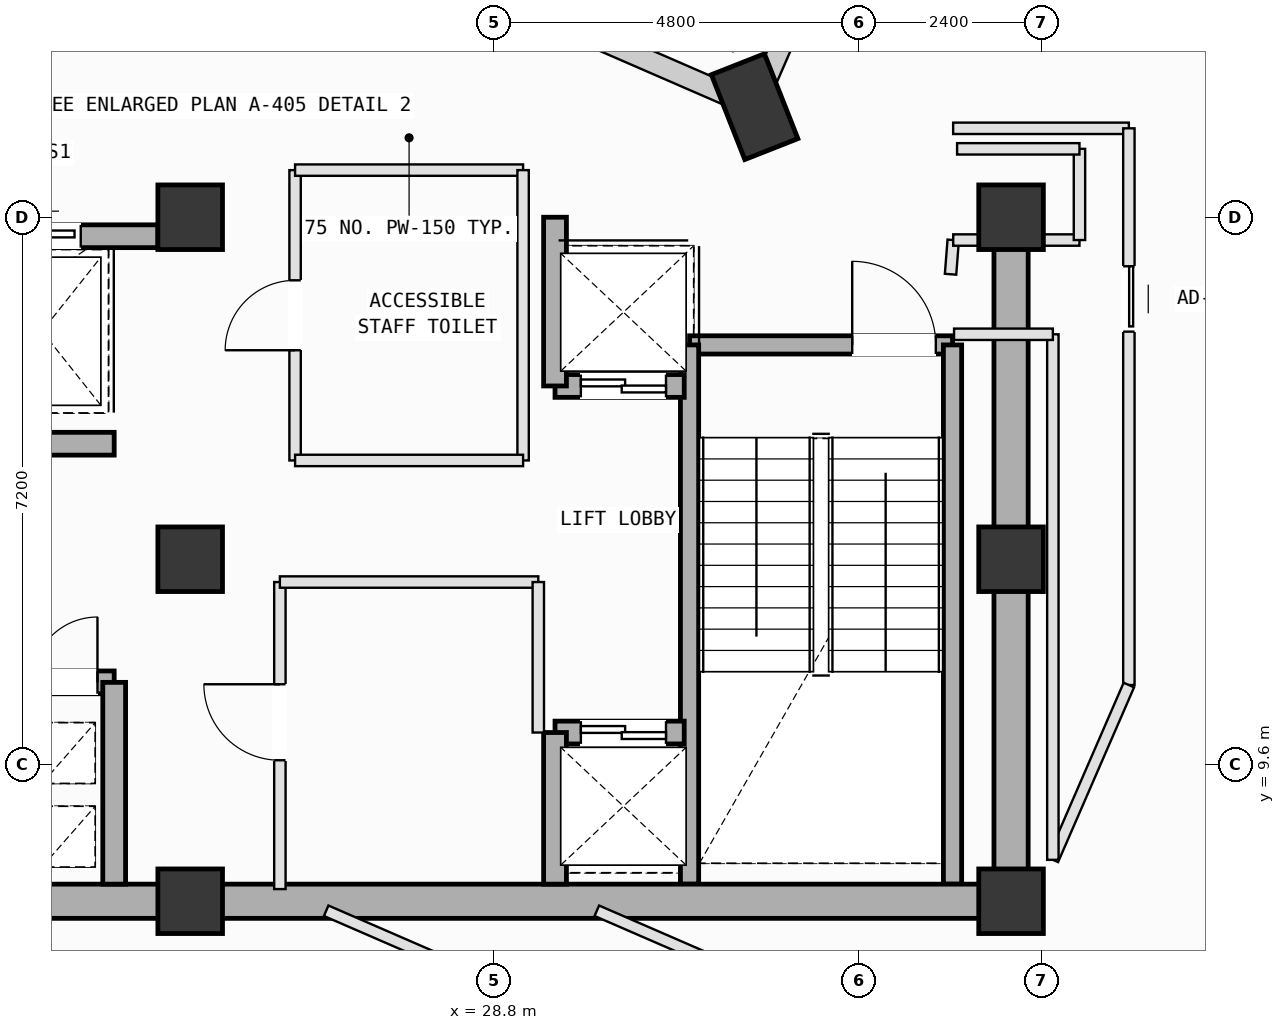
"""IFC4 building model, lengths in metres.
Left out: names, types, materials, properties, quantities, classifications, styles, units other than length and angle.
Written with IfcOpenShell. Run it as: python <this file> out.ifc"""

import sys

from ifc_helpers import new_model, si_unit, direction, frame, frame_2d, origin, origin_2d, place, context, subcontext, project, spatial, rectangle, extrude, element, fill, save


model = new_model("IFC4")
c1 = context("Model", 3, precision=1e-05, world=origin(), true_north=direction((0.0, 1.0)))
c2 = subcontext(c1, "Body", "Model", "MODEL_VIEW")
j1 = project(units=[si_unit("LENGTHUNIT", "METRE"), si_unit("PLANEANGLEUNIT", "RADIAN")], contexts=[c1])
p1 = place(None, origin())
s1 = spatial("IfcSite", under=j1, at=p1, CompositionType="ELEMENT")
p2 = place(p1, origin())
s2 = spatial("IfcBuilding", under=s1, at=p2, CompositionType="ELEMENT")
p3 = place(p2, frame((0.0, 0.0, 312.6)))
s3 = spatial("IfcBuildingStorey", under=s2, at=p3, CompositionType="ELEMENT", Elevation=312.6)
for number, where, z_axis, x_axis in (
    (1, (24.8, 7.8, 0.0), (0.0, 0.0, 1.0), (1.0, 0.0, 0.0)),
    (2, (24.8, 12.3, 0.0), (0.0, 0.0, 1.0), (1.0, 0.0, 0.0)),
    (3, (24.8, 16.8, 0.0), (0.0, 0.0, 1.0), (1.0, 0.0, 0.0)),
    (4, (35.6, 7.8, 0.0), (0.0, 0.0, 1.0), (1.0, 0.0, 0.0)),
    (5, (35.6, 12.3, 0.0), (0.0, 0.0, 1.0), (1.0, 0.0, 0.0)),
    (6, (35.6, 16.8, 0.0), (0.0, 0.0, 1.0), (1.0, 0.0, 0.0)),
):
    element("IfcColumn", number, at=place(p3, frame(where, z_axis=z_axis, x_axis=x_axis)), inside=s3, PredefinedType="COLUMN", context=c2, shape_type="SweptSolid", body=[
        extrude(rectangle(XDim=0.85, YDim=0.85, at=origin_2d()), origin(), (0.0, 0.0, 1.0), 4.0),
    ])
p4 = place(p3, frame((32.226, 18.255, 0.002), z_axis=(0.0, 0.0, 1.0), x_axis=(-0.366501226724, 0.930417567982, 0.0)))
e7 = element("IfcColumn", 7, at=p4, inside=s3, PredefinedType="COLUMN", context=c2, shape_type="SweptSolid", body=[
    extrude(rectangle(XDim=1.2, YDim=0.75, at=origin_2d()), origin(), (0.0, 0.0, 1.0), 3.996),
])
p5 = place(p3, frame((32.385, 18.619, 0.0), z_axis=(0.0, 0.0, 1.0), x_axis=(0.398753668733, 0.917058074318, 0.0)))
e8 = element("IfcWall", 8, at=p5, inside=s3, PredefinedType="SOLIDWALL", context=c2, shape_type="SweptSolid", body=[
    extrude(rectangle(XDim=6.155, YDim=0.28, at=frame_2d((3.078, 0.0))), origin(), (0.0, 0.0, 1.0), 3.265),
])
p6 = place(p5, frame((0.561, 0.0, 0.75)))
e9 = element("IfcOpeningElement", 9, at=p6, cuts=e8, PredefinedType="OPENING", context=c2, shape_type="SweptSolid", body=[
    extrude(rectangle(XDim=1.2, YDim=1.75, at=frame_2d((0.6, 0.875))), frame((0.0, 0.15, 0.0), z_axis=(0.0, -1.0, 0.0), x_axis=(1.0, 0.0, 0.0)), (0.0, 0.0, 1.0), 0.3),
])
p7 = place(p3, frame((25.484, 21.187, 0.0), z_axis=(0.0, 0.0, 1.0), x_axis=(0.917060568388, -0.398747932794, 0.0)))
e10 = element("IfcWall", 10, at=p7, inside=s3, PredefinedType="SOLIDWALL", context=c2, shape_type="SweptSolid", body=[
    extrude(rectangle(XDim=6.955, YDim=0.28, at=frame_2d((3.478, 0.0))), origin(), (0.0, 0.0, 1.0), 2.765),
])
p8 = place(p3, frame((31.37, 15.12, 0.0), z_axis=(0.0, 0.0, 1.0), x_axis=(1.0, 0.0, 0.0)))
e11 = element("IfcWall", 11, at=p8, inside=s3, PredefinedType="SOLIDWALL", context=c2, shape_type="SweptSolid", body=[
    extrude(rectangle(XDim=3.46, YDim=0.24, at=frame_2d((1.73, 0.0))), origin(), (0.0, 0.0, 1.0), 3.78),
])
p9 = place(p8, frame((2.14, 0.0, 0.0)))
e12 = element("IfcOpeningElement", 12, at=p9, cuts=e11, PredefinedType="OPENING", context=c2, shape_type="SweptSolid", body=[
    extrude(rectangle(XDim=1.1, YDim=2.15, at=frame_2d((0.55, 1.075))), frame((0.0, 0.13, 0.0), z_axis=(0.0, -1.0, 0.0), x_axis=(1.0, 0.0, 0.0)), (0.0, 0.0, 1.0), 0.26),
])
for number, where, z_axis, x_axis in (
    (13, (34.83, 15.12, 0.0), (0.0, 0.0, 1.0), (0.0, -1.0, 0.0)),
    (14, (31.37, 8.025, 0.0), (0.0, 0.0, 1.0), (0.0, 1.0, 0.0)),
):
    element("IfcWall", number, at=place(p3, frame(where, z_axis=z_axis, x_axis=x_axis)), inside=s3, PredefinedType="SOLIDWALL", context=c2, shape_type="SweptSolid", body=[
        extrude(rectangle(XDim=7.095, YDim=0.24, at=frame_2d((3.548, 0.0))), origin(), (0.0, 0.0, 1.0), 3.78),
    ])
for number, where, z_axis, x_axis in (
    (15, (14.0, 7.8, 0.0), (0.0, 0.0, 1.0), (1.0, 0.0, 0.0)),
    (16, (24.8, 7.8, 0.0), (0.0, 0.0, 1.0), (1.0, 0.0, 0.0)),
):
    element("IfcWall", number, at=place(p3, frame(where, z_axis=z_axis, x_axis=x_axis)), inside=s3, PredefinedType="SHEAR", context=c2, shape_type="SweptSolid", body=[
        extrude(rectangle(XDim=10.8, YDim=0.45, at=frame_2d((5.4, 0.0))), origin(), (0.0, 0.0, 1.0), 3.78),
    ])
p10 = place(p3, frame((35.6, 7.8, 0.0), z_axis=(0.0, 0.0, 1.0), x_axis=(0.0, 1.0, 0.0)))
e17 = element("IfcWall", 17, at=p10, inside=s3, PredefinedType="SHEAR", context=c2, shape_type="SweptSolid", body=[
    extrude(rectangle(XDim=9.0, YDim=0.45, at=frame_2d((4.5, 0.0))), origin(), (0.0, 0.0, 1.0), 3.78),
])
p11 = place(p3, frame((19.85, 16.55, 0.0), z_axis=(0.0, 0.0, 1.0), x_axis=(1.0, 0.0, 0.0)))
e18 = element("IfcWall", 18, at=p11, inside=s3, PredefinedType="SOLIDWALL", context=c2, shape_type="SweptSolid", body=[
    extrude(rectangle(XDim=4.525, YDim=0.3, at=frame_2d((2.262, 0.0))), origin(), (0.0, 0.0, 1.0), 3.78),
])
p12 = place(p11, frame((0.475, 0.0, 0.0)))
e19 = element("IfcOpeningElement", 19, at=p12, cuts=e18, PredefinedType="OPENING", context=c2, shape_type="SweptSolid", body=[
    extrude(rectangle(XDim=1.25, YDim=2.18, at=frame_2d((0.625, 1.09))), frame((0.0, 0.16, 0.0), z_axis=(0.0, -1.0, 0.0), x_axis=(1.0, 0.0, 0.0)), (0.0, 0.0, 1.0), 0.32),
])
p13 = place(p11, frame((2.49, 0.0, 0.0)))
e20 = element("IfcOpeningElement", 20, at=p13, cuts=e18, PredefinedType="OPENING", context=c2, shape_type="SweptSolid", body=[
    extrude(rectangle(XDim=1.02, YDim=2.12, at=frame_2d((0.51, 1.06))), frame((0.0, 0.16, 0.0), z_axis=(0.0, -1.0, 0.0), x_axis=(1.0, 0.0, 0.0)), (0.0, 0.0, 1.0), 0.32),
])
p14 = place(p3, frame((18.5, 10.68, 0.0), z_axis=(0.0, 0.0, 1.0), x_axis=(1.0, 0.0, 0.0)))
e21 = element("IfcWall", 21, at=p14, inside=s3, PredefinedType="SOLIDWALL", context=c2, shape_type="SweptSolid", body=[
    extrude(rectangle(XDim=5.3, YDim=0.3, at=frame_2d((2.65, 0.0))), origin(), (0.0, 0.0, 1.0), 3.78),
])
p15 = place(p14, frame((4.22, 0.0, 0.0)))
e22 = element("IfcOpeningElement", 22, at=p15, cuts=e21, PredefinedType="OPENING", context=c2, shape_type="SweptSolid", body=[
    extrude(rectangle(XDim=0.86, YDim=2.06, at=frame_2d((0.43, 1.03))), frame((0.0, 0.16, 0.0), z_axis=(0.0, -1.0, 0.0), x_axis=(1.0, 0.0, 0.0)), (0.0, 0.0, 1.0), 0.32),
])
p16 = place(p14, frame((0.425, 0.0, 0.0)))
e23 = element("IfcOpeningElement", 23, at=p16, cuts=e21, PredefinedType="OPENING", context=c2, shape_type="SweptSolid", body=[
    extrude(rectangle(XDim=1.25, YDim=2.18, at=frame_2d((0.625, 1.09))), frame((0.0, 0.16, 0.0), z_axis=(0.0, -1.0, 0.0), x_axis=(1.0, 0.0, 0.0)), (0.0, 0.0, 1.0), 0.32),
])
p17 = place(p14, frame((2.525, 0.0, 0.0)))
e24 = element("IfcOpeningElement", 24, at=p17, cuts=e21, PredefinedType="OPENING", context=c2, shape_type="SweptSolid", body=[
    extrude(rectangle(XDim=1.25, YDim=2.18, at=frame_2d((0.625, 1.09))), frame((0.0, 0.16, 0.0), z_axis=(0.0, -1.0, 0.0), x_axis=(1.0, 0.0, 0.0)), (0.0, 0.0, 1.0), 0.32),
])
p18 = place(p3, frame((18.5, 13.82, 0.0), z_axis=(0.0, 0.0, 1.0), x_axis=(1.0, 0.0, 0.0)))
e25 = element("IfcWall", 25, at=p18, inside=s3, PredefinedType="SOLIDWALL", context=c2, shape_type="SweptSolid", body=[
    extrude(rectangle(XDim=5.3, YDim=0.3, at=frame_2d((2.65, 0.0))), origin(), (0.0, 0.0, 1.0), 3.78),
])
p19 = place(p18, frame((0.18, 0.0, 0.0)))
e26 = element("IfcOpeningElement", 26, at=p19, cuts=e25, PredefinedType="OPENING", context=c2, shape_type="SweptSolid", body=[
    extrude(rectangle(XDim=1.1, YDim=2.15, at=frame_2d((0.55, 1.075))), frame((0.0, 0.16, 0.0), z_axis=(0.0, -1.0, 0.0), x_axis=(1.0, 0.0, 0.0)), (0.0, 0.0, 1.0), 0.32),
])
p20 = place(p3, frame((23.8, 8.025, 0.0), z_axis=(0.0, 0.0, 1.0), x_axis=(0.0, 1.0, 0.0)))
e27 = element("IfcWall", 27, at=p20, inside=s3, PredefinedType="SOLIDWALL", context=c2, shape_type="SweptSolid", body=[
    extrude(rectangle(XDim=2.655, YDim=0.3, at=frame_2d((1.328, 0.0))), origin(), (0.0, 0.0, 1.0), 3.78),
])
p21 = place(p3, frame((29.6, 10.02, 0.0), z_axis=(0.0, 0.0, 1.0), x_axis=(1.0, 0.0, 0.0)))
e28 = element("IfcWall", 28, at=p21, inside=s3, PredefinedType="SOLIDWALL", context=c2, shape_type="SweptSolid", body=[
    extrude(rectangle(XDim=1.7, YDim=0.3, at=frame_2d((0.85, 0.0))), origin(), (0.0, 0.0, 1.0), 3.78),
])
p22 = place(p21, frame((0.34, 0.0, 0.0)))
e29 = element("IfcOpeningElement", 29, at=p22, cuts=e28, PredefinedType="OPENING", context=c2, shape_type="SweptSolid", body=[
    extrude(rectangle(XDim=1.12, YDim=2.15, at=frame_2d((0.56, 1.075))), frame((0.0, 0.16, 0.0), z_axis=(0.0, -1.0, 0.0), x_axis=(1.0, 0.0, 0.0)), (0.0, 0.0, 1.0), 0.32),
])
p23 = place(p3, frame((29.6, 8.025, 0.0), z_axis=(0.0, 0.0, 1.0), x_axis=(0.0, 1.0, 0.0)))
e30 = element("IfcWall", 30, at=p23, inside=s3, PredefinedType="SOLIDWALL", context=c2, shape_type="SweptSolid", body=[
    extrude(rectangle(XDim=1.995, YDim=0.3, at=frame_2d((0.998, 0.0))), origin(), (0.0, 0.0, 1.0), 3.78),
])
p24 = place(p3, frame((29.6, 14.58, 0.0), z_axis=(0.0, 0.0, 1.0), x_axis=(1.0, 0.0, 0.0)))
e31 = element("IfcWall", 31, at=p24, inside=s3, PredefinedType="SOLIDWALL", context=c2, shape_type="SweptSolid", body=[
    extrude(rectangle(XDim=1.7, YDim=0.3, at=frame_2d((0.85, 0.0))), origin(), (0.0, 0.0, 1.0), 3.78),
])
p25 = place(p24, frame((0.34, 0.0, 0.0)))
e32 = element("IfcOpeningElement", 32, at=p25, cuts=e31, PredefinedType="OPENING", context=c2, shape_type="SweptSolid", body=[
    extrude(rectangle(XDim=1.12, YDim=2.15, at=frame_2d((0.56, 1.075))), frame((0.0, 0.16, 0.0), z_axis=(0.0, -1.0, 0.0), x_axis=(1.0, 0.0, 0.0)), (0.0, 0.0, 1.0), 0.32),
])
p26 = place(p3, frame((29.6, 14.58, 0.0), z_axis=(0.0, 0.0, 1.0), x_axis=(0.0, 1.0, 0.0)))
e33 = element("IfcWall", 33, at=p26, inside=s3, PredefinedType="SOLIDWALL", context=c2, shape_type="SweptSolid", body=[
    extrude(rectangle(XDim=2.22, YDim=0.3, at=frame_2d((1.11, 0.0))), origin(), (0.0, 0.0, 1.0), 3.78),
])
p27 = place(p3, frame((25.98, 7.96, 0.0), z_axis=(0.0, 0.0, 1.0), x_axis=(0.0, 1.0, 0.0)))
e34 = element("IfcWall", 34, at=p27, inside=s3, PredefinedType="PARTITIONING", context=c2, shape_type="SweptSolid", body=[
    extrude(rectangle(XDim=4.04, YDim=0.15, at=frame_2d((2.02, 0.0))), origin(), (0.0, 0.0, 1.0), 3.78),
])
p28 = place(p27, frame((1.695, 0.0, 0.0)))
e35 = element("IfcOpeningElement", 35, at=p28, cuts=e34, PredefinedType="OPENING", context=c2, shape_type="SweptSolid", body=[
    extrude(rectangle(XDim=1.0, YDim=2.12, at=frame_2d((0.5, 1.06))), frame((0.0, 0.085, 0.0), z_axis=(0.0, -1.0, 0.0), x_axis=(1.0, 0.0, 0.0)), (0.0, 0.0, 1.0), 0.17),
])
p29 = place(p3, frame((25.98, 12.0, 0.0), z_axis=(0.0, 0.0, 1.0), x_axis=(1.0, 0.0, 0.0)))
e36 = element("IfcWall", 36, at=p29, inside=s3, PredefinedType="PARTITIONING", context=c2, shape_type="SweptSolid", body=[
    extrude(rectangle(XDim=3.4, YDim=0.15, at=frame_2d((1.7, 0.0))), origin(), (0.0, 0.0, 1.0), 3.78),
])
p30 = place(p3, frame((29.38, 12.0, 0.0), z_axis=(0.0, 0.0, 1.0), x_axis=(0.0, -1.0, 0.0)))
e37 = element("IfcWall", 37, at=p30, inside=s3, PredefinedType="PARTITIONING", context=c2, shape_type="SweptSolid", body=[
    extrude(rectangle(XDim=1.98, YDim=0.15, at=frame_2d((0.99, 0.0))), origin(), (0.0, 0.0, 1.0), 3.78),
])
p31 = place(p3, frame((26.18, 13.6, 0.0), z_axis=(0.0, 0.0, 1.0), x_axis=(0.0, 1.0, 0.0)))
e38 = element("IfcWall", 38, at=p31, inside=s3, PredefinedType="PARTITIONING", context=c2, shape_type="SweptSolid", body=[
    extrude(rectangle(XDim=3.82, YDim=0.15, at=frame_2d((1.91, 0.0))), origin(), (0.0, 0.0, 1.0), 3.78),
])
p32 = place(p31, frame((1.45, 0.0, 0.0)))
e39 = element("IfcOpeningElement", 39, at=p32, cuts=e38, PredefinedType="OPENING", context=c2, shape_type="SweptSolid", body=[
    extrude(rectangle(XDim=0.92, YDim=2.1, at=frame_2d((0.46, 1.05))), frame((0.0, 0.085, 0.0), z_axis=(0.0, -1.0, 0.0), x_axis=(1.0, 0.0, 0.0)), (0.0, 0.0, 1.0), 0.17),
])
p33 = place(p3, frame((26.18, 17.42, 0.0), z_axis=(0.0, 0.0, 1.0), x_axis=(1.0, 0.0, 0.0)))
e40 = element("IfcWall", 40, at=p33, inside=s3, PredefinedType="PARTITIONING", context=c2, shape_type="SweptSolid", body=[
    extrude(rectangle(XDim=3.0, YDim=0.15, at=frame_2d((1.5, 0.0))), origin(), (0.0, 0.0, 1.0), 3.78),
])
p34 = place(p3, frame((29.18, 17.42, 0.0), z_axis=(0.0, 0.0, 1.0), x_axis=(0.0, -1.0, 0.0)))
e41 = element("IfcWall", 41, at=p34, inside=s3, PredefinedType="PARTITIONING", context=c2, shape_type="SweptSolid", body=[
    extrude(rectangle(XDim=3.82, YDim=0.15, at=frame_2d((1.91, 0.0))), origin(), (0.0, 0.0, 1.0), 3.78),
])
p35 = place(p3, frame((29.18, 13.6, 0.0), z_axis=(0.0, 0.0, 1.0), x_axis=(-1.0, 0.0, 0.0)))
e42 = element("IfcWall", 42, at=p35, inside=s3, PredefinedType="PARTITIONING", context=c2, shape_type="SweptSolid", body=[
    extrude(rectangle(XDim=3.0, YDim=0.15, at=frame_2d((1.5, 0.0))), origin(), (0.0, 0.0, 1.0), 3.78),
])
p36 = place(p3, frame((33.286, -4.26, 0.0), z_axis=(0.0, 0.0, 1.0), x_axis=(0.398794571869, 0.9170402878, 0.0)))
e43 = element("IfcWall", 43, at=p36, inside=s3, PredefinedType="PARTITIONING", context=c2, shape_type="SweptSolid", body=[
    extrude(rectangle(XDim=13.04, YDim=0.15, at=frame_2d((6.52, 0.0))), origin(), (0.0, 0.0, 1.0), 2.765),
])
p37 = place(p3, frame((26.589, 7.675, 0.0), z_axis=(0.0, 0.0, 1.0), x_axis=(0.917085632944, -0.398690283112, 0.0)))
e44 = element("IfcWall", 44, at=p37, inside=s3, PredefinedType="PARTITIONING", context=c2, shape_type="SweptSolid", body=[
    extrude(rectangle(XDim=10.216, YDim=0.15, at=frame_2d((5.108, 0.0))), origin(), (0.0, 0.0, 1.0), 3.78),
])
p38 = place(p37, frame((5.131, 0.0, 0.0)))
e45 = element("IfcOpeningElement", 45, at=p38, cuts=e44, PredefinedType="OPENING", context=c2, shape_type="SweptSolid", body=[
    extrude(rectangle(XDim=0.86, YDim=2.06, at=frame_2d((0.43, 1.03))), frame((0.0, 0.085, 0.0), z_axis=(0.0, -1.0, 0.0), x_axis=(1.0, 0.0, 0.0)), (0.0, 0.0, 1.0), 0.17),
])
p39 = place(p3, frame((34.804, 16.05, 0.0), z_axis=(0.0, 0.0, 1.0), x_axis=(0.077896068279, 0.996961484987, 0.0)))
e46 = element("IfcWall", 46, at=p39, inside=s3, PredefinedType="PARTITIONING", context=c2, shape_type="SweptSolid", body=[
    extrude(rectangle(XDim=0.451, YDim=0.15, at=frame_2d((0.226, 0.0))), origin(), (0.0, 0.0, 1.0), 3.78),
])
p40 = place(p3, frame((34.839, 16.5, 0.0), z_axis=(0.0, 0.0, 1.0), x_axis=(1.0, 0.0, 0.0)))
e47 = element("IfcWall", 47, at=p40, inside=s3, PredefinedType="PARTITIONING", context=c2, shape_type="SweptSolid", body=[
    extrude(rectangle(XDim=1.661, YDim=0.15, at=frame_2d((0.831, 0.0))), origin(), (0.0, 0.0, 1.0), 2.765),
])
p41 = place(p3, frame((36.5, 16.5, 0.0), z_axis=(0.0, 0.0, 1.0), x_axis=(0.0, 1.0, 0.0)))
e48 = element("IfcWall", 48, at=p41, inside=s3, PredefinedType="PARTITIONING", context=c2, shape_type="SweptSolid", body=[
    extrude(rectangle(XDim=1.2, YDim=0.15, at=frame_2d((0.6, 0.0))), origin(), (0.0, 0.0, 1.0), 3.78),
])
p42 = place(p3, frame((36.5, 17.7, 0.0), z_axis=(0.0, 0.0, 1.0), x_axis=(-1.0, 0.0, 0.0)))
e49 = element("IfcWall", 49, at=p42, inside=s3, PredefinedType="PARTITIONING", context=c2, shape_type="SweptSolid", body=[
    extrude(rectangle(XDim=1.61, YDim=0.15, at=frame_2d((0.805, 0.0))), origin(), (0.0, 0.0, 1.0), 3.78),
])
p43 = place(p3, frame((34.838, 17.97, 0.0), z_axis=(0.0, 0.0, 1.0), x_axis=(1.0, 0.0, 0.0)))
e50 = element("IfcWall", 50, at=p43, inside=s3, PredefinedType="PARTITIONING", context=c2, shape_type="SweptSolid", body=[
    extrude(rectangle(XDim=2.312, YDim=0.15, at=frame_2d((1.156, 0.0))), origin(), (0.0, 0.0, 1.0), 3.78),
])
p44 = place(p3, frame((37.15, 17.97, 0.0), z_axis=(0.0, 0.0, 1.0), x_axis=(0.0, -1.0, 0.0)))
e51 = element("IfcWall", 51, at=p44, inside=s3, PredefinedType="PARTITIONING", context=c2, shape_type="SweptSolid", body=[
    extrude(rectangle(XDim=7.325, YDim=0.15, at=frame_2d((3.663, 0.0))), origin(), (0.0, 0.0, 1.0), 3.78),
])
p45 = place(p44, frame((1.815, 0.0, 0.0)))
e52 = element("IfcOpeningElement", 52, at=p45, cuts=e51, PredefinedType="OPENING", context=c2, shape_type="SweptSolid", body=[
    extrude(rectangle(XDim=0.86, YDim=2.06, at=frame_2d((0.43, 1.03))), frame((0.0, 0.085, 0.0), z_axis=(0.0, -1.0, 0.0), x_axis=(1.0, 0.0, 0.0)), (0.0, 0.0, 1.0), 0.17),
])
p46 = place(p3, frame((37.15, 10.645, 0.0), z_axis=(0.0, 0.0, 1.0), x_axis=(-0.398718992482, -0.917073151409, 0.0)))
e53 = element("IfcWall", 53, at=p46, inside=s3, PredefinedType="PARTITIONING", context=c2, shape_type="SweptSolid", body=[
    extrude(rectangle(XDim=2.508, YDim=0.15, at=frame_2d((1.254, 0.0))), origin(), (0.0, 0.0, 1.0), 3.78),
])
p47 = place(p3, frame((36.15, 8.345, 0.0), z_axis=(0.0, 0.0, 1.0), x_axis=(0.0, 1.0, 0.0)))
e54 = element("IfcWall", 54, at=p47, inside=s3, PredefinedType="PARTITIONING", context=c2, shape_type="SweptSolid", body=[
    extrude(rectangle(XDim=6.915, YDim=0.15, at=frame_2d((3.458, 0.0))), origin(), (0.0, 0.0, 1.0), 3.78),
])
p48 = place(p3, frame((36.15, 15.26, 0.0), z_axis=(0.0, 0.0, 1.0), x_axis=(-1.0, 0.0, 0.0)))
e55 = element("IfcWall", 55, at=p48, inside=s3, PredefinedType="PARTITIONING", context=c2, shape_type="SweptSolid", body=[
    extrude(rectangle(XDim=1.3, YDim=0.15, at=frame_2d((0.65, 0.0))), origin(), (0.0, 0.0, 1.0), 3.78),
])
p49 = place(p3, frame((30.15, 7.675, 0.0), z_axis=(0.0, 0.0, 1.0), x_axis=(0.917103960726, -0.398648122059, 0.0)))
e56 = element("IfcWall", 56, at=p49, inside=s3, PredefinedType="PARTITIONING", context=c2, shape_type="SweptSolid", body=[
    extrude(rectangle(XDim=5.266, YDim=0.15, at=frame_2d((2.633, 0.0))), origin(), (0.0, 0.0, 1.0), 3.78),
])
p50 = place(p9, origin())
e57 = element("IfcDoor", 57, at=p50, inside=s3, OperationType="SINGLE_SWING_LEFT", PredefinedType="DOOR", context=c2, shape_type="SweptSolid", body=[
    extrude(rectangle(XDim=1.1, YDim=2.15, at=frame_2d((0.55, 1.075))), frame((0.0, 0.025, 0.0), z_axis=(0.0, -1.0, 0.0), x_axis=(1.0, 0.0, 0.0)), (0.0, 0.0, 1.0), 0.05),
])
fill(e12, e57)
p51 = place(p15, origin())
e58 = element("IfcDoor", 58, at=p51, inside=s3, OperationType="SINGLE_SWING_RIGHT", PredefinedType="DOOR", context=c2, shape_type="SweptSolid", body=[
    extrude(rectangle(XDim=0.86, YDim=2.06, at=frame_2d((0.43, 1.03))), frame((0.0, 0.025, 0.0), z_axis=(0.0, -1.0, 0.0), x_axis=(1.0, 0.0, 0.0)), (0.0, 0.0, 1.0), 0.05),
])
fill(e22, e58)
p52 = place(p22, origin())
e59 = element("IfcDoor", 59, at=p52, inside=s3, OperationType="DOUBLE_DOOR_SLIDING", PredefinedType="DOOR", context=c2, shape_type="SweptSolid", body=[
    extrude(rectangle(XDim=1.12, YDim=2.15, at=frame_2d((0.56, 1.075))), frame((0.0, 0.025, 0.0), z_axis=(0.0, -1.0, 0.0), x_axis=(1.0, 0.0, 0.0)), (0.0, 0.0, 1.0), 0.05),
])
fill(e29, e59)
p53 = place(p25, origin())
e60 = element("IfcDoor", 60, at=p53, inside=s3, OperationType="DOUBLE_DOOR_SLIDING", PredefinedType="DOOR", context=c2, shape_type="SweptSolid", body=[
    extrude(rectangle(XDim=1.12, YDim=2.15, at=frame_2d((0.56, 1.075))), frame((0.0, 0.025, 0.0), z_axis=(0.0, -1.0, 0.0), x_axis=(1.0, 0.0, 0.0)), (0.0, 0.0, 1.0), 0.05),
])
fill(e32, e60)
p54 = place(p13, origin())
e61 = element("IfcDoor", 61, at=p54, inside=s3, OperationType="SLIDING_TO_LEFT", PredefinedType="DOOR", context=c2, shape_type="SweptSolid", body=[
    extrude(rectangle(XDim=1.02, YDim=2.12, at=frame_2d((0.51, 1.06))), frame((0.0, 0.025, 0.0), z_axis=(0.0, -1.0, 0.0), x_axis=(1.0, 0.0, 0.0)), (0.0, 0.0, 1.0), 0.05),
])
fill(e20, e61)
p55 = place(p28, origin())
e62 = element("IfcDoor", 62, at=p55, inside=s3, OperationType="SINGLE_SWING_RIGHT", PredefinedType="DOOR", context=c2, shape_type="SweptSolid", body=[
    extrude(rectangle(XDim=1.0, YDim=2.12, at=frame_2d((0.5, 1.06))), frame((0.0, 0.025, 0.0), z_axis=(0.0, -1.0, 0.0), x_axis=(1.0, 0.0, 0.0)), (0.0, 0.0, 1.0), 0.05),
])
fill(e35, e62)
p56 = place(p32, origin())
e63 = element("IfcDoor", 63, at=p56, inside=s3, OperationType="SINGLE_SWING_LEFT", PredefinedType="DOOR", context=c2, shape_type="SweptSolid", body=[
    extrude(rectangle(XDim=0.92, YDim=2.1, at=frame_2d((0.46, 1.05))), frame((0.0, 0.025, 0.0), z_axis=(0.0, -1.0, 0.0), x_axis=(1.0, 0.0, 0.0)), (0.0, 0.0, 1.0), 0.05),
])
fill(e39, e63)
p57 = place(p45, origin())
e64 = element("IfcDoor", 64, at=p57, inside=s3, OperationType="SLIDING_TO_LEFT", PredefinedType="DOOR", context=c2, shape_type="SweptSolid", body=[
    extrude(rectangle(XDim=0.86, YDim=2.06, at=frame_2d((0.43, 1.03))), frame((0.0, 0.025, 0.0), z_axis=(0.0, -1.0, 0.0), x_axis=(1.0, 0.0, 0.0)), (0.0, 0.0, 1.0), 0.05),
])
fill(e52, e64)
save(model, sys.argv[1])
